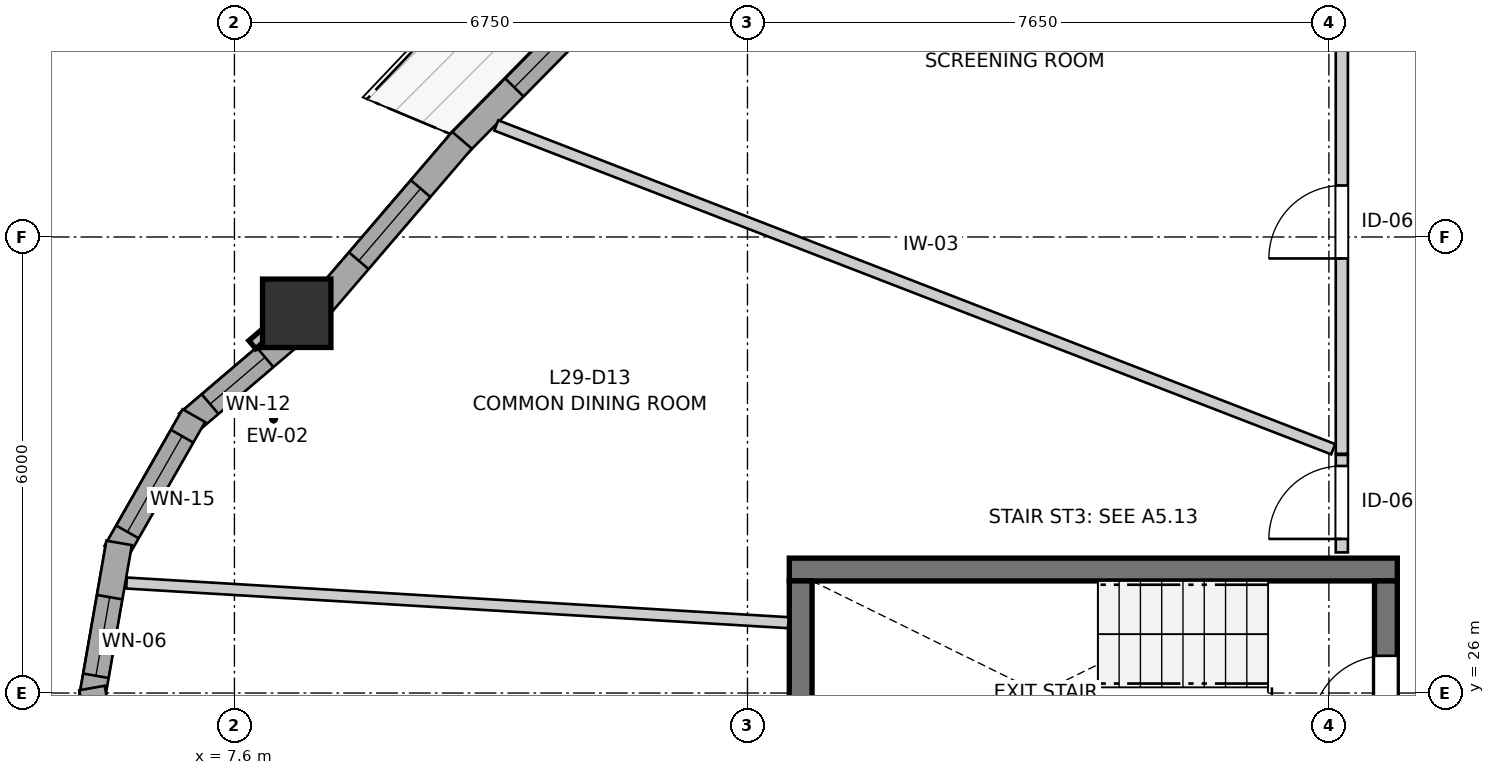
"""IFC4 building model, lengths in metres.
Left out: names, types, materials, properties, quantities, classifications, styles, units other than length and angle.
Written with IfcOpenShell. Run it as: python <this file> out.ifc"""

import sys

from ifc_helpers import new_model, si_unit, direction, frame, frame_2d, origin, origin_2d, place, context, subcontext, project, spatial, rectangle, extrude, source, transform, mapped, element, fill, save


model = new_model("IFC4")
c1 = context("Model", 3, precision=1e-05, world=origin(), true_north=direction((0.0, 1.0)))
c2 = subcontext(c1, "Body", "Model", "MODEL_VIEW")
j1 = project(units=[si_unit("LENGTHUNIT", "METRE"), si_unit("PLANEANGLEUNIT", "RADIAN")], contexts=[c1])
p1 = place(None, origin())
s1 = spatial("IfcSite", under=j1, at=p1, CompositionType="ELEMENT")
p2 = place(p1, origin())
s2 = spatial("IfcBuilding", under=s1, at=p2, CompositionType="ELEMENT")
p3 = place(p2, frame((0.0, 0.0, 99.2)))
s3 = spatial("IfcBuildingStorey", under=s2, at=p3, CompositionType="ELEMENT", Elevation=99.2)
p4 = place(p3, frame((22.9, 27.625, 0.0), z_axis=(0.0, 0.0, 1.0), x_axis=(-1.0, 0.0, 0.0)))
e1 = element("IfcWall", 1, at=p4, inside=s3, PredefinedType="SHEAR", context=c2, shape_type="SweptSolid", body=[
    extrude(rectangle(XDim=8.0, YDim=0.3, at=frame_2d((4.0, 0.0))), origin(), (0.0, 0.0, 1.0), 2.95),
])
p5 = place(p3, frame((15.05, 27.475, 0.0), z_axis=(0.0, 0.0, 1.0), x_axis=(0.0, -1.0, 0.0)))
e2 = element("IfcWall", 2, at=p5, inside=s3, PredefinedType="SHEAR", context=c2, shape_type="SweptSolid", body=[
    extrude(rectangle(XDim=2.95, YDim=0.3, at=frame_2d((1.475, 0.0))), origin(), (0.0, 0.0, 1.0), 2.95),
])
p6 = place(p3, frame((22.75, 24.525, 0.0), z_axis=(0.0, 0.0, 1.0), x_axis=(0.0, 1.0, 0.0)))
e3 = element("IfcWall", 3, at=p6, inside=s3, PredefinedType="SHEAR", context=c2, shape_type="SweptSolid", body=[
    extrude(rectangle(XDim=2.95, YDim=0.3, at=frame_2d((1.475, 0.0))), origin(), (0.0, 0.0, 1.0), 2.95),
])
p7 = place(p6, frame((0.985, 0.0, 0.0)))
e4 = element("IfcOpeningElement", 4, at=p7, cuts=e3, PredefinedType="OPENING", context=c2, shape_type="SweptSolid", body=[
    extrude(rectangle(XDim=0.98, YDim=2.15, at=frame_2d((0.49, 1.075))), frame((0.0, 0.16, 0.0), z_axis=(0.0, -1.0, 0.0), x_axis=(1.0, 0.0, 0.0)), (0.0, 0.0, 1.0), 0.32),
])
m1 = source(origin(), c2, "Body", "SweptSolid", [
    extrude(rectangle(XDim=0.9, YDim=0.9, at=origin_2d()), origin(), (0.0, 0.0, 1.0), 2.95),
])
p8 = place(p3, frame((8.419, 30.996, 0.0), z_axis=(0.0, 0.0, 1.0), x_axis=(1.0, 0.0, 0.0)))
e5 = element("IfcColumn", 5, at=p8, inside=s3, PredefinedType="COLUMN", context=c2, shape_type="MappedRepresentation", body=[
    mapped(m1, transform((0.0, 0.0, 0.0), x_axis=(1.0, 0.0, 0.0), y_axis=(0.0, 1.0, 0.0), z_axis=(0.0, 0.0, 1.0), scale=1.0)),
])
p9 = place(p3, frame((8.355, 30.718, 0.0), z_axis=(0.0, 0.0, 1.0), x_axis=(-0.761134405886, -0.648594184507, 0.0)))
e6 = element("IfcWall", 6, at=p9, inside=s3, PredefinedType="SOLIDWALL", context=c2, shape_type="SweptSolid", body=[
    extrude(rectangle(XDim=1.805, YDim=0.34, at=frame_2d((0.902, 0.0))), origin(), (0.0, 0.0, 1.0), 2.48),
])
p10 = place(p9, frame((0.462, 0.0, 0.82)))
e7 = element("IfcOpeningElement", 7, at=p10, cuts=e6, PredefinedType="OPENING", context=c2, shape_type="SweptSolid", body=[
    extrude(rectangle(XDim=0.95, YDim=1.35, at=frame_2d((0.475, 0.675))), frame((0.0, 0.18, 0.0), z_axis=(0.0, -1.0, 0.0), x_axis=(1.0, 0.0, 0.0)), (0.0, 0.0, 1.0), 0.36),
])
p11 = place(p3, frame((7.066, 29.65, 0.0), z_axis=(0.0, 0.0, 1.0), x_axis=(-0.496037473582, -0.868301114132, 0.0)))
e8 = element("IfcWall", 8, at=p11, inside=s3, PredefinedType="SOLIDWALL", context=c2, shape_type="SweptSolid", body=[
    extrude(rectangle(XDim=2.073, YDim=0.34, at=frame_2d((1.037, 0.0))), origin(), (0.0, 0.0, 1.0), 2.48),
])
p12 = place(p11, frame((0.312, 0.0, 0.82)))
e9 = element("IfcOpeningElement", 9, at=p12, cuts=e8, PredefinedType="OPENING", context=c2, shape_type="SweptSolid", body=[
    extrude(rectangle(XDim=1.45, YDim=1.25, at=frame_2d((0.725, 0.625))), frame((0.0, 0.18, 0.0), z_axis=(0.0, -1.0, 0.0), x_axis=(1.0, 0.0, 0.0)), (0.0, 0.0, 1.0), 0.36),
])
p13 = place(p3, frame((6.083, 27.975, 0.0), z_axis=(0.0, 0.0, 1.0), x_axis=(-0.172186061474, -0.985064444711, 0.0)))
e10 = element("IfcWall", 10, at=p13, inside=s3, PredefinedType="SOLIDWALL", context=c2, shape_type="SweptSolid", body=[
    extrude(rectangle(XDim=2.073, YDim=0.34, at=frame_2d((1.037, 0.0))), origin(), (0.0, 0.0, 1.0), 2.48),
])
p14 = place(p13, frame((0.725, 0.0, 0.82)))
e11 = element("IfcOpeningElement", 11, at=p14, cuts=e10, PredefinedType="OPENING", context=c2, shape_type="SweptSolid", body=[
    extrude(rectangle(XDim=1.05, YDim=1.45, at=frame_2d((0.525, 0.725))), frame((0.0, 0.18, 0.0), z_axis=(0.0, -1.0, 0.0), x_axis=(1.0, 0.0, 0.0)), (0.0, 0.0, 1.0), 0.36),
])
p15 = place(p3, frame((5.726, 26.067, 0.0), z_axis=(0.0, 0.0, 1.0), x_axis=(0.172186061474, -0.985064444711, 0.0)))
e12 = element("IfcWall", 12, at=p15, inside=s3, PredefinedType="SOLIDWALL", context=c2, shape_type="SweptSolid", body=[
    extrude(rectangle(XDim=2.073, YDim=0.34, at=frame_2d((1.037, 0.0))), origin(), (0.0, 0.0, 1.0), 2.48),
])
p16 = place(p15, frame((0.312, 0.0, 0.82)))
e13 = element("IfcOpeningElement", 13, at=p16, cuts=e12, PredefinedType="OPENING", context=c2, shape_type="SweptSolid", body=[
    extrude(rectangle(XDim=1.45, YDim=1.25, at=frame_2d((0.725, 0.625))), frame((0.0, 0.18, 0.0), z_axis=(0.0, -1.0, 0.0), x_axis=(1.0, 0.0, 0.0)), (0.0, 0.0, 1.0), 0.36),
])
p17 = place(p3, frame((12.682, 35.386, 0.0), z_axis=(0.0, 0.0, 1.0), x_axis=(-0.701899134886, -0.712276353985, 0.0)))
e14 = element("IfcWall", 14, at=p17, inside=s3, PredefinedType="SOLIDWALL", context=c2, shape_type="SweptSolid", body=[
    extrude(rectangle(XDim=3.058, YDim=0.34, at=frame_2d((1.529, 0.0))), origin(), (0.0, 0.0, 1.0), 2.48),
])
p18 = place(p17, frame((0.593, 0.0, 0.82)))
e15 = element("IfcOpeningElement", 15, at=p18, cuts=e14, PredefinedType="OPENING", context=c2, shape_type="SweptSolid", body=[
    extrude(rectangle(XDim=1.4, YDim=1.35, at=frame_2d((0.7, 0.675))), frame((0.0, 0.18, 0.0), z_axis=(0.0, -1.0, 0.0), x_axis=(1.0, 0.0, 0.0)), (0.0, 0.0, 1.0), 0.36),
])
p19 = place(p3, frame((10.594, 33.272, 0.0), z_axis=(0.0, 0.0, 1.0), x_axis=(-0.650763769467, -0.759280262057, 0.0)))
e16 = element("IfcWall", 16, at=p19, inside=s3, PredefinedType="SOLIDWALL", context=c2, shape_type="SweptSolid", body=[
    extrude(rectangle(XDim=2.914, YDim=0.34, at=frame_2d((1.457, 0.0))), origin(), (0.0, 0.0, 1.0), 2.48),
])
p20 = place(p19, frame((0.837, 0.0, 0.82)))
e17 = element("IfcOpeningElement", 17, at=p20, cuts=e16, PredefinedType="OPENING", context=c2, shape_type="SweptSolid", body=[
    extrude(rectangle(XDim=1.25, YDim=1.35, at=frame_2d((0.625, 0.675))), frame((0.0, 0.18, 0.0), z_axis=(0.0, -1.0, 0.0), x_axis=(1.0, 0.0, 0.0)), (0.0, 0.0, 1.0), 0.36),
])
p21 = place(p3, frame((22.17, 29.148, 0.0), z_axis=(0.0, 0.0, 1.0), x_axis=(0.0, 1.0, 0.0)))
e18 = element("IfcWall", 18, at=p21, inside=s3, PredefinedType="PARTITIONING", context=c2, shape_type="SweptSolid", body=[
    extrude(rectangle(XDim=6.106, YDim=0.16, at=frame_2d((3.053, 0.0))), origin(), (0.0, 0.0, 1.0), 2.95),
])
p22 = place(p21, frame((2.57, 0.0, 0.0)))
e19 = element("IfcOpeningElement", 19, at=p22, cuts=e18, PredefinedType="OPENING", context=c2, shape_type="SweptSolid", body=[
    extrude(rectangle(XDim=0.96, YDim=2.1, at=frame_2d((0.48, 1.05))), frame((0.0, 0.09, 0.0), z_axis=(0.0, -1.0, 0.0), x_axis=(1.0, 0.0, 0.0)), (0.0, 0.0, 1.0), 0.18),
])
p23 = place(p3, frame((22.17, 27.85, 0.0), z_axis=(0.0, 0.0, 1.0), x_axis=(0.0, 1.0, 0.0)))
e20 = element("IfcWall", 20, at=p23, inside=s3, PredefinedType="PARTITIONING", context=c2, shape_type="SweptSolid", body=[
    extrude(rectangle(XDim=1.283, YDim=0.16, at=frame_2d((0.642, 0.0))), origin(), (0.0, 0.0, 1.0), 2.95),
])
p24 = place(p23, frame((0.177, 0.0, 0.0)))
e21 = element("IfcOpeningElement", 21, at=p24, cuts=e20, PredefinedType="OPENING", context=c2, shape_type="SweptSolid", body=[
    extrude(rectangle(XDim=0.96, YDim=2.1, at=frame_2d((0.48, 1.05))), frame((0.0, 0.09, 0.0), z_axis=(0.0, -1.0, 0.0), x_axis=(1.0, 0.0, 0.0)), (0.0, 0.0, 1.0), 0.18),
])
p25 = place(p3, frame((11.045, 33.468, 0.0), z_axis=(0.0, 0.0, 1.0), x_axis=(0.932653180854, -0.360774228906, 0.0)))
e22 = element("IfcWall", 22, at=p25, inside=s3, PredefinedType="PARTITIONING", context=c2, shape_type="SweptSolid", body=[
    extrude(rectangle(XDim=11.807, YDim=0.145, at=frame_2d((5.903, 0.0))), origin(), (0.0, 0.0, 1.0), 2.95),
])
p26 = place(p3, frame((6.18, 27.448, 0.0), z_axis=(0.0, 0.0, 1.0), x_axis=(0.998209995059, -0.059806402362, 0.0)))
e23 = element("IfcWall", 23, at=p26, inside=s3, PredefinedType="PARTITIONING", context=c2, shape_type="SweptSolid", body=[
    extrude(rectangle(XDim=8.724, YDim=0.145, at=frame_2d((4.362, 0.0))), origin(), (0.0, 0.0, 1.0), 2.95),
])
m2 = source(origin(), c2, "Body", "SweptSolid", [
    extrude(rectangle(XDim=0.95, YDim=1.35, at=frame_2d((0.475, 0.675))), frame((0.0, 0.03, 0.0), z_axis=(0.0, -1.0, 0.0), x_axis=(1.0, 0.0, 0.0)), (0.0, 0.0, 1.0), 0.06),
])
p27 = place(p10, origin())
e24 = element("IfcWindow", 24, at=p27, inside=s3, PartitioningType="SINGLE_PANEL", PredefinedType="WINDOW", context=c2, shape_type="MappedRepresentation", body=[
    mapped(m2, transform((0.0, 0.0, 0.0), x_axis=(1.0, 0.0, 0.0), y_axis=(0.0, 1.0, 0.0), z_axis=(0.0, 0.0, 1.0), scale=1.0)),
])
fill(e7, e24)
m3 = source(origin(), c2, "Body", "SweptSolid", [
    extrude(rectangle(XDim=1.45, YDim=1.25, at=frame_2d((0.725, 0.625))), frame((0.0, 0.03, 0.0), z_axis=(0.0, -1.0, 0.0), x_axis=(1.0, 0.0, 0.0)), (0.0, 0.0, 1.0), 0.06),
])
p28 = place(p12, origin())
e25 = element("IfcWindow", 25, at=p28, inside=s3, PartitioningType="SINGLE_PANEL", PredefinedType="WINDOW", context=c2, shape_type="MappedRepresentation", body=[
    mapped(m3, transform((0.0, 0.0, 0.0), x_axis=(1.0, 0.0, 0.0), y_axis=(0.0, 1.0, 0.0), z_axis=(0.0, 0.0, 1.0), scale=1.0)),
])
fill(e9, e25)
m4 = source(origin(), c2, "Body", "SweptSolid", [
    extrude(rectangle(XDim=1.05, YDim=1.45, at=frame_2d((0.525, 0.725))), frame((0.0, 0.03, 0.0), z_axis=(0.0, -1.0, 0.0), x_axis=(1.0, 0.0, 0.0)), (0.0, 0.0, 1.0), 0.06),
])
p29 = place(p14, origin())
e26 = element("IfcWindow", 26, at=p29, inside=s3, PartitioningType="SINGLE_PANEL", PredefinedType="WINDOW", context=c2, shape_type="MappedRepresentation", body=[
    mapped(m4, transform((0.0, 0.0, 0.0), x_axis=(1.0, 0.0, 0.0), y_axis=(0.0, 1.0, 0.0), z_axis=(0.0, 0.0, 1.0), scale=1.0)),
])
fill(e11, e26)
m5 = source(origin(), c2, "Body", "SweptSolid", [
    extrude(rectangle(XDim=1.4, YDim=1.35, at=frame_2d((0.7, 0.675))), frame((0.0, 0.03, 0.0), z_axis=(0.0, -1.0, 0.0), x_axis=(1.0, 0.0, 0.0)), (0.0, 0.0, 1.0), 0.06),
])
p30 = place(p18, origin())
e27 = element("IfcWindow", 27, at=p30, inside=s3, PartitioningType="SINGLE_PANEL", PredefinedType="WINDOW", context=c2, shape_type="MappedRepresentation", body=[
    mapped(m5, transform((0.0, 0.0, 0.0), x_axis=(1.0, 0.0, 0.0), y_axis=(0.0, 1.0, 0.0), z_axis=(0.0, 0.0, 1.0), scale=1.0)),
])
fill(e15, e27)
m6 = source(origin(), c2, "Body", "SweptSolid", [
    extrude(rectangle(XDim=1.25, YDim=1.35, at=frame_2d((0.625, 0.675))), frame((0.0, 0.03, 0.0), z_axis=(0.0, -1.0, 0.0), x_axis=(1.0, 0.0, 0.0)), (0.0, 0.0, 1.0), 0.06),
])
p31 = place(p20, origin())
e28 = element("IfcWindow", 28, at=p31, inside=s3, PartitioningType="SINGLE_PANEL", PredefinedType="WINDOW", context=c2, shape_type="MappedRepresentation", body=[
    mapped(m6, transform((0.0, 0.0, 0.0), x_axis=(1.0, 0.0, 0.0), y_axis=(0.0, 1.0, 0.0), z_axis=(0.0, 0.0, 1.0), scale=1.0)),
])
fill(e17, e28)
m7 = source(origin(), c2, "Body", "SweptSolid", [
    extrude(rectangle(XDim=0.98, YDim=2.15, at=frame_2d((0.49, 1.075))), frame((0.0, 0.025, 0.0), z_axis=(0.0, -1.0, 0.0), x_axis=(1.0, 0.0, 0.0)), (0.0, 0.0, 1.0), 0.05),
])
p32 = place(p7, origin())
e29 = element("IfcDoor", 29, at=p32, inside=s3, OperationType="SINGLE_SWING_LEFT", PredefinedType="DOOR", context=c2, shape_type="MappedRepresentation", body=[
    mapped(m7, transform((0.0, 0.0, 0.0), x_axis=(1.0, 0.0, 0.0), y_axis=(0.0, 1.0, 0.0), z_axis=(0.0, 0.0, 1.0), scale=1.0)),
])
fill(e4, e29)
m8 = source(origin(), c2, "Body", "SweptSolid", [
    extrude(rectangle(XDim=0.96, YDim=2.1, at=frame_2d((0.48, 1.05))), frame((0.0, 0.025, 0.0), z_axis=(0.0, -1.0, 0.0), x_axis=(1.0, 0.0, 0.0)), (0.0, 0.0, 1.0), 0.05),
])
p33 = place(p22, origin())
e30 = element("IfcDoor", 30, at=p33, inside=s3, OperationType="SINGLE_SWING_LEFT", PredefinedType="DOOR", context=c2, shape_type="MappedRepresentation", body=[
    mapped(m8, transform((0.0, 0.0, 0.0), x_axis=(1.0, 0.0, 0.0), y_axis=(0.0, 1.0, 0.0), z_axis=(0.0, 0.0, 1.0), scale=1.0)),
])
fill(e19, e30)
p34 = place(p24, origin())
e31 = element("IfcDoor", 31, at=p34, inside=s3, OperationType="SINGLE_SWING_LEFT", PredefinedType="DOOR", context=c2, shape_type="MappedRepresentation", body=[
    mapped(m8, transform((0.0, 0.0, 0.0), x_axis=(1.0, 0.0, 0.0), y_axis=(0.0, 1.0, 0.0), z_axis=(0.0, 0.0, 1.0), scale=1.0)),
])
fill(e21, e31)
save(model, sys.argv[1])
